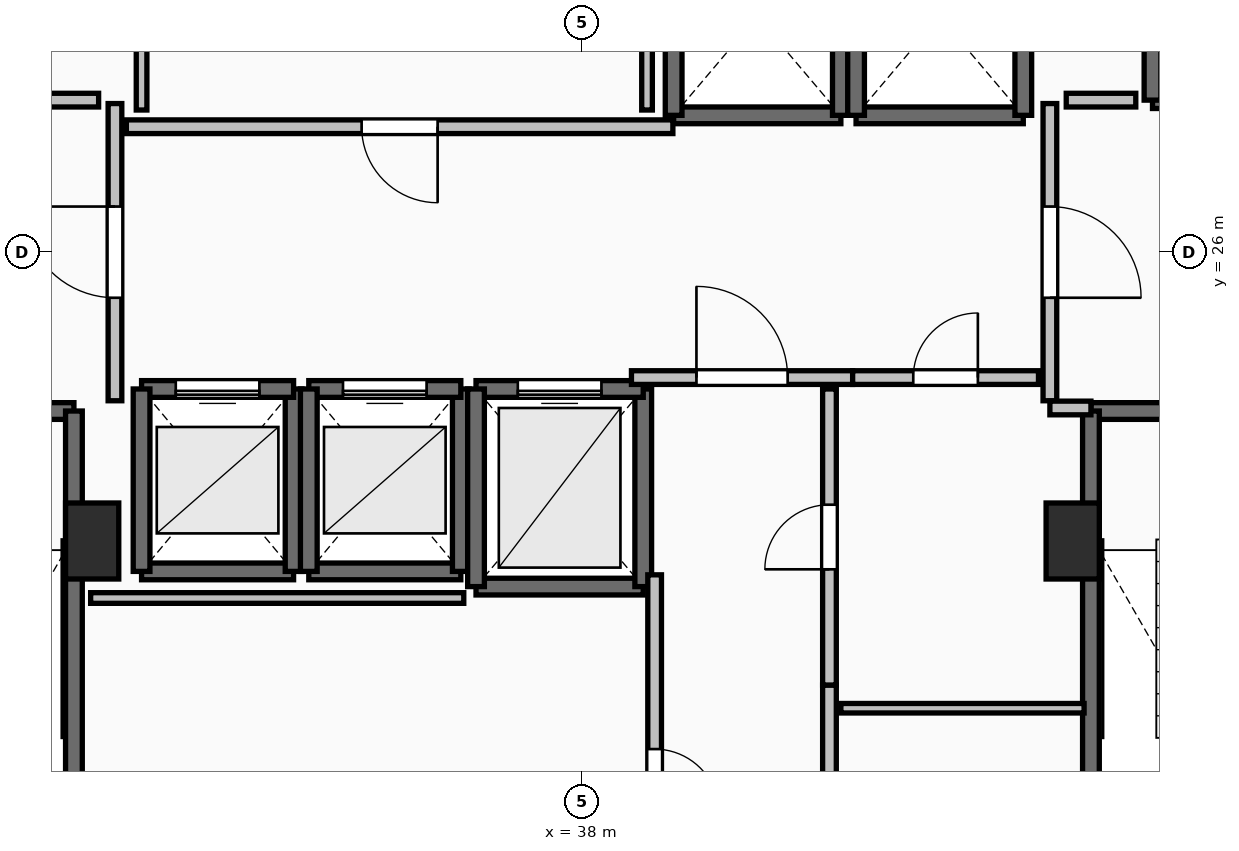
"""IFC4 building model, lengths in metres.
Left out: names, types, materials, properties, quantities, classifications, styles, units other than length and angle.
Written with IfcOpenShell. Run it as: python <this file> out.ifc"""

import sys

from ifc_helpers import new_model, si_unit, direction, frame, frame_2d, origin, origin_2d, place, context, subcontext, project, spatial, rectangle, extrude, element, fill, save


model = new_model("IFC4")
c1 = context("Model", 3, precision=1e-05, world=origin(), true_north=direction((0.0, 1.0)))
c2 = subcontext(c1, "Body", "Model", "MODEL_VIEW")
j1 = project(units=[si_unit("LENGTHUNIT", "METRE"), si_unit("PLANEANGLEUNIT", "RADIAN")], contexts=[c1])
p1 = place(None, origin())
s1 = spatial("IfcSite", under=j1, at=p1, CompositionType="ELEMENT")
p2 = place(p1, origin())
s2 = spatial("IfcBuilding", under=s1, at=p2, CompositionType="ELEMENT")
p3 = place(p2, frame((0.0, 0.0, 182.6)))
s3 = spatial("IfcBuildingStorey", under=s2, at=p3, CompositionType="ELEMENT", Elevation=182.6)
for number, where, z_axis, x_axis in (
    (1, (31.55, 22.2, 0.0), (0.0, 0.0, 1.0), (1.0, 0.0, 0.0)),
    (2, (44.45, 22.2, 0.0), (0.0, 0.0, 1.0), (1.0, 0.0, 0.0)),
):
    element("IfcColumn", number, at=place(p3, frame(where, z_axis=z_axis, x_axis=x_axis)), inside=s3, PredefinedType="PILASTER", context=c2, shape_type="SweptSolid", body=[
        extrude(rectangle(XDim=0.7, YDim=1.0, at=origin_2d()), origin(), (0.0, 0.0, 1.0), 3.5),
    ])
p4 = place(p3, frame((27.94, 23.91, 0.0), z_axis=(0.0, 0.0, 1.0), x_axis=(1.0, 0.0, 0.0)))
e3 = element("IfcWall", 3, at=p4, inside=s3, PredefinedType="SOLIDWALL", context=c2, shape_type="SweptSolid", body=[
    extrude(rectangle(XDim=3.37, YDim=0.22, at=frame_2d((1.685, 0.0))), origin(), (0.0, 0.0, 1.0), 3.24),
])
p5 = place(p4, frame((1.135, 0.0, 0.0)))
e4 = element("IfcOpeningElement", 4, at=p5, cuts=e3, PredefinedType="OPENING", context=c2, shape_type="SweptSolid", body=[
    extrude(rectangle(XDim=1.1, YDim=2.15, at=frame_2d((0.55, 1.075))), frame((0.0, 0.125, 0.0), z_axis=(0.0, -1.0, 0.0), x_axis=(1.0, 0.0, 0.0)), (0.0, 0.0, 1.0), 0.25),
])
p6 = place(p3, frame((31.31, 23.91, 0.0), z_axis=(0.0, 0.0, 1.0), x_axis=(0.0, -1.0, 0.0)))
e5 = element("IfcWall", 5, at=p6, inside=s3, PredefinedType="SOLIDWALL", context=c2, shape_type="SweptSolid", body=[
    extrude(rectangle(XDim=7.42, YDim=0.22, at=frame_2d((3.71, 0.0))), origin(), (0.0, 0.0, 1.0), 3.24),
])
p7 = place(p3, frame((44.69, 23.91, 0.0), z_axis=(0.0, 0.0, 1.0), x_axis=(1.0, 0.0, 0.0)))
e6 = element("IfcWall", 6, at=p7, inside=s3, PredefinedType="SOLIDWALL", context=c2, shape_type="SweptSolid", body=[
    extrude(rectangle(XDim=3.37, YDim=0.22, at=frame_2d((1.685, 0.0))), origin(), (0.0, 0.0, 1.0), 3.24),
])
p8 = place(p7, frame((1.135, 0.0, 0.0)))
e7 = element("IfcOpeningElement", 7, at=p8, cuts=e6, PredefinedType="OPENING", context=c2, shape_type="SweptSolid", body=[
    extrude(rectangle(XDim=1.1, YDim=2.15, at=frame_2d((0.55, 1.075))), frame((0.0, 0.125, 0.0), z_axis=(0.0, -1.0, 0.0), x_axis=(1.0, 0.0, 0.0)), (0.0, 0.0, 1.0), 0.25),
])
p9 = place(p3, frame((44.69, 16.49, 0.0), z_axis=(0.0, 0.0, 1.0), x_axis=(0.0, 1.0, 0.0)))
e8 = element("IfcWall", 8, at=p9, inside=s3, PredefinedType="SOLIDWALL", context=c2, shape_type="SweptSolid", body=[
    extrude(rectangle(XDim=7.42, YDim=0.22, at=frame_2d((3.71, 0.0))), origin(), (0.0, 0.0, 1.0), 3.24),
])
p10 = place(p3, frame((32.2, 21.8, 0.0), z_axis=(0.0, 0.0, 1.0), x_axis=(1.0, 0.0, 0.0)))
e9 = element("IfcWall", 9, at=p10, inside=s3, PredefinedType="SOLIDWALL", context=c2, shape_type="SweptSolid", body=[
    extrude(rectangle(XDim=2.0, YDim=0.22, at=frame_2d((1.0, 0.0))), origin(), (0.0, 0.0, 1.0), 3.24),
])
p11 = place(p3, frame((34.2, 21.8, 0.0), z_axis=(0.0, 0.0, 1.0), x_axis=(0.0, 1.0, 0.0)))
e10 = element("IfcWall", 10, at=p11, inside=s3, PredefinedType="SOLIDWALL", context=c2, shape_type="SweptSolid", body=[
    extrude(rectangle(XDim=2.4, YDim=0.22, at=frame_2d((1.2, 0.0))), origin(), (0.0, 0.0, 1.0), 3.24),
])
p12 = place(p3, frame((34.2, 24.2, 0.0), z_axis=(0.0, 0.0, 1.0), x_axis=(-1.0, 0.0, 0.0)))
e11 = element("IfcWall", 11, at=p12, inside=s3, PredefinedType="SOLIDWALL", context=c2, shape_type="SweptSolid", body=[
    extrude(rectangle(XDim=2.0, YDim=0.22, at=frame_2d((1.0, 0.0))), origin(), (0.0, 0.0, 1.0), 3.24),
])
p13 = place(p12, frame((0.45, 0.0, 0.0)))
e12 = element("IfcOpeningElement", 12, at=p13, cuts=e11, PredefinedType="OPENING", context=c2, shape_type="SweptSolid", body=[
    extrude(rectangle(XDim=1.1, YDim=2.2, at=frame_2d((0.55, 1.1))), frame((0.0, 0.125, 0.0), z_axis=(0.0, -1.0, 0.0), x_axis=(1.0, 0.0, 0.0)), (0.0, 0.0, 1.0), 0.25),
])
p14 = place(p3, frame((32.2, 24.2, 0.0), z_axis=(0.0, 0.0, 1.0), x_axis=(0.0, -1.0, 0.0)))
e13 = element("IfcWall", 13, at=p14, inside=s3, PredefinedType="SOLIDWALL", context=c2, shape_type="SweptSolid", body=[
    extrude(rectangle(XDim=2.4, YDim=0.22, at=frame_2d((1.2, 0.0))), origin(), (0.0, 0.0, 1.0), 3.24),
])
p15 = place(p3, frame((34.4, 21.8, 0.0), z_axis=(0.0, 0.0, 1.0), x_axis=(1.0, 0.0, 0.0)))
e14 = element("IfcWall", 14, at=p15, inside=s3, PredefinedType="SOLIDWALL", context=c2, shape_type="SweptSolid", body=[
    extrude(rectangle(XDim=2.0, YDim=0.22, at=frame_2d((1.0, 0.0))), origin(), (0.0, 0.0, 1.0), 3.24),
])
p16 = place(p3, frame((36.4, 21.8, 0.0), z_axis=(0.0, 0.0, 1.0), x_axis=(0.0, 1.0, 0.0)))
e15 = element("IfcWall", 15, at=p16, inside=s3, PredefinedType="SOLIDWALL", context=c2, shape_type="SweptSolid", body=[
    extrude(rectangle(XDim=2.4, YDim=0.22, at=frame_2d((1.2, 0.0))), origin(), (0.0, 0.0, 1.0), 3.24),
])
p17 = place(p3, frame((36.4, 24.2, 0.0), z_axis=(0.0, 0.0, 1.0), x_axis=(-1.0, 0.0, 0.0)))
e16 = element("IfcWall", 16, at=p17, inside=s3, PredefinedType="SOLIDWALL", context=c2, shape_type="SweptSolid", body=[
    extrude(rectangle(XDim=2.0, YDim=0.22, at=frame_2d((1.0, 0.0))), origin(), (0.0, 0.0, 1.0), 3.24),
])
p18 = place(p17, frame((0.45, 0.0, 0.0)))
e17 = element("IfcOpeningElement", 17, at=p18, cuts=e16, PredefinedType="OPENING", context=c2, shape_type="SweptSolid", body=[
    extrude(rectangle(XDim=1.1, YDim=2.2, at=frame_2d((0.55, 1.1))), frame((0.0, 0.125, 0.0), z_axis=(0.0, -1.0, 0.0), x_axis=(1.0, 0.0, 0.0)), (0.0, 0.0, 1.0), 0.25),
])
p19 = place(p3, frame((34.4, 24.2, 0.0), z_axis=(0.0, 0.0, 1.0), x_axis=(0.0, -1.0, 0.0)))
e18 = element("IfcWall", 18, at=p19, inside=s3, PredefinedType="SOLIDWALL", context=c2, shape_type="SweptSolid", body=[
    extrude(rectangle(XDim=2.4, YDim=0.22, at=frame_2d((1.2, 0.0))), origin(), (0.0, 0.0, 1.0), 3.24),
])
p20 = place(p3, frame((36.6, 21.6, 0.0), z_axis=(0.0, 0.0, 1.0), x_axis=(1.0, 0.0, 0.0)))
e19 = element("IfcWall", 19, at=p20, inside=s3, PredefinedType="SOLIDWALL", context=c2, shape_type="SweptSolid", body=[
    extrude(rectangle(XDim=2.2, YDim=0.22, at=frame_2d((1.1, 0.0))), origin(), (0.0, 0.0, 1.0), 3.24),
])
p21 = place(p3, frame((38.8, 21.6, 0.0), z_axis=(0.0, 0.0, 1.0), x_axis=(0.0, 1.0, 0.0)))
e20 = element("IfcWall", 20, at=p21, inside=s3, PredefinedType="SOLIDWALL", context=c2, shape_type="SweptSolid", body=[
    extrude(rectangle(XDim=2.6, YDim=0.22, at=frame_2d((1.3, 0.0))), origin(), (0.0, 0.0, 1.0), 3.24),
])
p22 = place(p3, frame((38.8, 24.2, 0.0), z_axis=(0.0, 0.0, 1.0), x_axis=(-1.0, 0.0, 0.0)))
e21 = element("IfcWall", 21, at=p22, inside=s3, PredefinedType="SOLIDWALL", context=c2, shape_type="SweptSolid", body=[
    extrude(rectangle(XDim=2.2, YDim=0.22, at=frame_2d((1.1, 0.0))), origin(), (0.0, 0.0, 1.0), 3.24),
])
p23 = place(p22, frame((0.55, 0.0, 0.0)))
e22 = element("IfcOpeningElement", 22, at=p23, cuts=e21, PredefinedType="OPENING", context=c2, shape_type="SweptSolid", body=[
    extrude(rectangle(XDim=1.1, YDim=2.2, at=frame_2d((0.55, 1.1))), frame((0.0, 0.125, 0.0), z_axis=(0.0, -1.0, 0.0), x_axis=(1.0, 0.0, 0.0)), (0.0, 0.0, 1.0), 0.25),
])
p24 = place(p3, frame((36.6, 24.2, 0.0), z_axis=(0.0, 0.0, 1.0), x_axis=(0.0, -1.0, 0.0)))
e23 = element("IfcWall", 23, at=p24, inside=s3, PredefinedType="SOLIDWALL", context=c2, shape_type="SweptSolid", body=[
    extrude(rectangle(XDim=2.6, YDim=0.22, at=frame_2d((1.3, 0.0))), origin(), (0.0, 0.0, 1.0), 3.24),
])
p25 = place(p3, frame((39.2, 27.8, 0.0), z_axis=(0.0, 0.0, 1.0), x_axis=(1.0, 0.0, 0.0)))
e24 = element("IfcWall", 24, at=p25, inside=s3, PredefinedType="SOLIDWALL", context=c2, shape_type="SweptSolid", body=[
    extrude(rectangle(XDim=2.2, YDim=0.22, at=frame_2d((1.1, 0.0))), origin(), (0.0, 0.0, 1.0), 3.24),
])
for number, where, z_axis, x_axis in (
    (25, (41.4, 27.8, 0.0), (0.0, 0.0, 1.0), (0.0, 1.0, 0.0)),
    (26, (39.2, 30.4, 0.0), (0.0, 0.0, 1.0), (0.0, -1.0, 0.0)),
):
    element("IfcWall", number, at=place(p3, frame(where, z_axis=z_axis, x_axis=x_axis)), inside=s3, PredefinedType="SOLIDWALL", context=c2, shape_type="SweptSolid", body=[
        extrude(rectangle(XDim=2.6, YDim=0.22, at=frame_2d((1.3, 0.0))), origin(), (0.0, 0.0, 1.0), 3.24),
    ])
p26 = place(p3, frame((41.6, 27.8, 0.0), z_axis=(0.0, 0.0, 1.0), x_axis=(1.0, 0.0, 0.0)))
e27 = element("IfcWall", 27, at=p26, inside=s3, PredefinedType="SOLIDWALL", context=c2, shape_type="SweptSolid", body=[
    extrude(rectangle(XDim=2.2, YDim=0.22, at=frame_2d((1.1, 0.0))), origin(), (0.0, 0.0, 1.0), 3.24),
])
for number, where, z_axis, x_axis in (
    (28, (43.8, 27.8, 0.0), (0.0, 0.0, 1.0), (0.0, 1.0, 0.0)),
    (29, (41.6, 30.4, 0.0), (0.0, 0.0, 1.0), (0.0, -1.0, 0.0)),
):
    element("IfcWall", number, at=place(p3, frame(where, z_axis=z_axis, x_axis=x_axis)), inside=s3, PredefinedType="SOLIDWALL", context=c2, shape_type="SweptSolid", body=[
        extrude(rectangle(XDim=2.6, YDim=0.22, at=frame_2d((1.3, 0.0))), origin(), (0.0, 0.0, 1.0), 3.24),
    ])
p27 = place(p3, frame((45.5, 28.0, 0.0), z_axis=(0.0, 0.0, 1.0), x_axis=(1.0, 0.0, 0.0)))
e30 = element("IfcWall", 30, at=p27, inside=s3, PredefinedType="SHEAR", context=c2, shape_type="SweptSolid", body=[
    extrude(rectangle(XDim=2.4, YDim=0.22, at=frame_2d((1.2, 0.0))), origin(), (0.0, 0.0, 1.0), 3.24),
])
p28 = place(p27, frame((0.6, 0.0, 0.0)))
e31 = element("IfcOpeningElement", 31, at=p28, cuts=e30, PredefinedType="OPENING", context=c2, shape_type="SweptSolid", body=[
    extrude(rectangle(XDim=1.2, YDim=2.2, at=frame_2d((0.6, 1.1))), frame((0.0, 0.125, 0.0), z_axis=(0.0, -1.0, 0.0), x_axis=(1.0, 0.0, 0.0)), (0.0, 0.0, 1.0), 0.25),
])
p29 = place(p3, frame((45.5, 30.5, 0.0), z_axis=(0.0, 0.0, 1.0), x_axis=(0.0, -1.0, 0.0)))
e32 = element("IfcWall", 32, at=p29, inside=s3, PredefinedType="SHEAR", context=c2, shape_type="SweptSolid", body=[
    extrude(rectangle(XDim=2.5, YDim=0.22, at=frame_2d((1.25, 0.0))), origin(), (0.0, 0.0, 1.0), 3.24),
])
p30 = place(p3, frame((31.85, 24.045, 0.0), z_axis=(0.0, 0.0, 1.0), x_axis=(0.0, 1.0, 0.0)))
e33 = element("IfcWall", 33, at=p30, inside=s3, PredefinedType="PARTITIONING", context=c2, shape_type="SweptSolid", body=[
    extrude(rectangle(XDim=3.91, YDim=0.18, at=frame_2d((1.955, 0.0))), origin(), (0.0, 0.0, 1.0), 3.24),
])
p31 = place(p30, frame((1.355, 0.0, 0.0)))
e34 = element("IfcOpeningElement", 34, at=p31, cuts=e33, PredefinedType="OPENING", context=c2, shape_type="SweptSolid", body=[
    extrude(rectangle(XDim=1.2, YDim=2.15, at=frame_2d((0.6, 1.075))), frame((0.0, 0.105, 0.0), z_axis=(0.0, -1.0, 0.0), x_axis=(1.0, 0.0, 0.0)), (0.0, 0.0, 1.0), 0.21),
])
p32 = place(p3, frame((44.15, 27.955, 0.0), z_axis=(0.0, 0.0, 1.0), x_axis=(0.0, -1.0, 0.0)))
e35 = element("IfcWall", 35, at=p32, inside=s3, PredefinedType="PARTITIONING", context=c2, shape_type="SweptSolid", body=[
    extrude(rectangle(XDim=3.91, YDim=0.18, at=frame_2d((1.955, 0.0))), origin(), (0.0, 0.0, 1.0), 3.24),
])
p33 = place(p32, frame((1.355, 0.0, 0.0)))
e36 = element("IfcOpeningElement", 36, at=p33, cuts=e35, PredefinedType="OPENING", context=c2, shape_type="SweptSolid", body=[
    extrude(rectangle(XDim=1.2, YDim=2.15, at=frame_2d((0.6, 1.075))), frame((0.0, 0.105, 0.0), z_axis=(0.0, -1.0, 0.0), x_axis=(1.0, 0.0, 0.0)), (0.0, 0.0, 1.0), 0.21),
])
p34 = place(p3, frame((44.15, 23.95, 0.0), z_axis=(0.0, 0.0, 1.0), x_axis=(1.0, 0.0, 0.0)))
e37 = element("IfcWall", 37, at=p34, inside=s3, PredefinedType="PARTITIONING", context=c2, shape_type="SweptSolid", body=[
    extrude(rectangle(XDim=0.54, YDim=0.18, at=frame_2d((0.27, 0.0))), origin(), (0.0, 0.0, 1.0), 3.24),
])
p35 = place(p3, frame((38.645, 24.35, 0.0), z_axis=(0.0, 0.0, 1.0), x_axis=(1.0, 0.0, 0.0)))
e38 = element("IfcWall", 38, at=p35, inside=s3, PredefinedType="PARTITIONING", context=c2, shape_type="SweptSolid", body=[
    extrude(rectangle(XDim=2.91, YDim=0.18, at=frame_2d((1.455, 0.0))), origin(), (0.0, 0.0, 1.0), 3.24),
])
p36 = place(p35, frame((0.855, 0.0, 0.0)))
e39 = element("IfcOpeningElement", 39, at=p36, cuts=e38, PredefinedType="OPENING", context=c2, shape_type="SweptSolid", body=[
    extrude(rectangle(XDim=1.2, YDim=2.15, at=frame_2d((0.6, 1.075))), frame((0.0, 0.105, 0.0), z_axis=(0.0, -1.0, 0.0), x_axis=(1.0, 0.0, 0.0)), (0.0, 0.0, 1.0), 0.21),
])
p37 = place(p3, frame((41.555, 24.35, 0.0), z_axis=(0.0, 0.0, 1.0), x_axis=(1.0, 0.0, 0.0)))
e40 = element("IfcWall", 40, at=p37, inside=s3, PredefinedType="PARTITIONING", context=c2, shape_type="SweptSolid", body=[
    extrude(rectangle(XDim=2.445, YDim=0.18, at=frame_2d((1.223, 0.0))), origin(), (0.0, 0.0, 1.0), 3.24),
])
p38 = place(p37, frame((0.798, 0.0, 0.0)))
e41 = element("IfcOpeningElement", 41, at=p38, cuts=e40, PredefinedType="OPENING", context=c2, shape_type="SweptSolid", body=[
    extrude(rectangle(XDim=0.85, YDim=2.1, at=frame_2d((0.425, 1.05))), frame((0.0, 0.105, 0.0), z_axis=(0.0, -1.0, 0.0), x_axis=(1.0, 0.0, 0.0)), (0.0, 0.0, 1.0), 0.21),
])
p39 = place(p3, frame((39.19, 27.65, 0.0), z_axis=(0.0, 0.0, 1.0), x_axis=(-1.0, 0.0, 0.0)))
e42 = element("IfcWall", 42, at=p39, inside=s3, PredefinedType="PARTITIONING", context=c2, shape_type="SweptSolid", body=[
    extrude(rectangle(XDim=7.19, YDim=0.18, at=frame_2d((3.595, 0.0))), origin(), (0.0, 0.0, 1.0), 3.24),
])
p40 = place(p39, frame((3.095, 0.0, 0.0)))
e43 = element("IfcOpeningElement", 43, at=p40, cuts=e42, PredefinedType="OPENING", context=c2, shape_type="SweptSolid", body=[
    extrude(rectangle(XDim=1.0, YDim=2.15, at=frame_2d((0.5, 1.075))), frame((0.0, 0.105, 0.0), z_axis=(0.0, -1.0, 0.0), x_axis=(1.0, 0.0, 0.0)), (0.0, 0.0, 1.0), 0.21),
])
p41 = place(p3, frame((41.25, 16.32, 0.0), z_axis=(0.0, 0.0, 1.0), x_axis=(0.0, 1.0, 0.0)))
e44 = element("IfcWall", 44, at=p41, inside=s3, PredefinedType="PARTITIONING", context=c2, shape_type="SweptSolid", body=[
    extrude(rectangle(XDim=3.985, YDim=0.18, at=frame_2d((1.992, 0.0))), origin(), (0.0, 0.0, 1.0), 3.24),
])
p42 = place(p41, frame((1.593, 0.0, 0.0)))
e45 = element("IfcOpeningElement", 45, at=p42, cuts=e44, PredefinedType="OPENING", context=c2, shape_type="SweptSolid", body=[
    extrude(rectangle(XDim=0.8, YDim=2.05, at=frame_2d((0.4, 1.025))), frame((0.0, 0.105, 0.0), z_axis=(0.0, -1.0, 0.0), x_axis=(1.0, 0.0, 0.0)), (0.0, 0.0, 1.0), 0.21),
])
p43 = place(p3, frame((41.25, 20.305, 0.0), z_axis=(0.0, 0.0, 1.0), x_axis=(0.0, 1.0, 0.0)))
e46 = element("IfcWall", 46, at=p43, inside=s3, PredefinedType="PARTITIONING", context=c2, shape_type="SweptSolid", body=[
    extrude(rectangle(XDim=3.895, YDim=0.18, at=frame_2d((1.948, 0.0))), origin(), (0.0, 0.0, 1.0), 3.24),
])
p44 = place(p43, frame((1.522, 0.0, 0.0)))
e47 = element("IfcOpeningElement", 47, at=p44, cuts=e46, PredefinedType="OPENING", context=c2, shape_type="SweptSolid", body=[
    extrude(rectangle(XDim=0.85, YDim=2.1, at=frame_2d((0.425, 1.05))), frame((0.0, 0.105, 0.0), z_axis=(0.0, -1.0, 0.0), x_axis=(1.0, 0.0, 0.0)), (0.0, 0.0, 1.0), 0.21),
])
p45 = place(p3, frame((38.95, 21.755, 0.0), z_axis=(0.0, 0.0, 1.0), x_axis=(0.0, -1.0, 0.0)))
e48 = element("IfcWall", 48, at=p45, inside=s3, PredefinedType="PARTITIONING", context=c2, shape_type="SweptSolid", body=[
    extrude(rectangle(XDim=5.435, YDim=0.18, at=frame_2d((2.717, 0.0))), origin(), (0.0, 0.0, 1.0), 3.24),
])
p46 = place(p45, frame((2.292, 0.0, 0.0)))
e49 = element("IfcOpeningElement", 49, at=p46, cuts=e48, PredefinedType="OPENING", context=c2, shape_type="SweptSolid", body=[
    extrude(rectangle(XDim=0.85, YDim=2.1, at=frame_2d((0.425, 1.05))), frame((0.0, 0.105, 0.0), z_axis=(0.0, -1.0, 0.0), x_axis=(1.0, 0.0, 0.0)), (0.0, 0.0, 1.0), 0.21),
])
p47 = place(p3, frame((44.6, 20.0, 0.0), z_axis=(0.0, 0.0, 1.0), x_axis=(-1.0, 0.0, 0.0)))
e50 = element("IfcWall", 50, at=p47, inside=s3, PredefinedType="PARTITIONING", context=c2, shape_type="SweptSolid", body=[
    extrude(rectangle(XDim=3.2, YDim=0.125, at=frame_2d((1.6, 0.0))), origin(), (0.0, 0.0, 1.0), 3.24),
])
for number, where, z_axis, x_axis in (
    (51, (31.635, 28.0, 0.0), (0.0, 0.0, 1.0), (-1.0, 0.0, 0.0)),
    (52, (45.28, 28.0, 0.0), (0.0, 0.0, 1.0), (-1.0, 0.0, 0.0)),
):
    element("IfcWall", number, at=place(p3, frame(where, z_axis=z_axis, x_axis=x_axis)), inside=s3, PredefinedType="PARTITIONING", context=c2, shape_type="SweptSolid", body=[
        extrude(rectangle(XDim=0.915, YDim=0.18, at=frame_2d((0.458, 0.0))), origin(), (0.0, 0.0, 1.0), 3.24),
    ])
p48 = place(p3, frame((36.439, 21.45, 0.0), z_axis=(0.0, 0.0, 1.0), x_axis=(-1.0, 0.0, 0.0)))
e53 = element("IfcWall", 53, at=p48, inside=s3, PredefinedType="PARTITIONING", context=c2, shape_type="SweptSolid", body=[
    extrude(rectangle(XDim=4.909, YDim=0.14, at=frame_2d((2.455, 0.0))), origin(), (0.0, 0.0, 1.0), 3.24),
])
for number, where, z_axis, x_axis in (
    (54, (32.2, 30.26, 0.0), (0.0, 0.0, 1.0), (0.0, -1.0, 0.0)),
    (55, (38.85, 27.87, 0.0), (0.0, 0.0, 1.0), (0.0, 1.0, 0.0)),
):
    element("IfcWall", number, at=place(p3, frame(where, z_axis=z_axis, x_axis=x_axis)), inside=s3, PredefinedType="PARTITIONING", context=c2, shape_type="SweptSolid", body=[
        extrude(rectangle(XDim=2.39, YDim=0.14, at=frame_2d((1.195, 0.0))), origin(), (0.0, 0.0, 1.0), 3.24),
    ])
p49 = place(p13, origin())
e56 = element("IfcDoor", 56, at=p49, inside=s3, OperationType="SLIDING_TO_LEFT", PredefinedType="DOOR", context=c2, shape_type="SweptSolid", body=[
    extrude(rectangle(XDim=1.1, YDim=2.2, at=frame_2d((0.55, 1.1))), frame((0.0, 0.025, 0.0), z_axis=(0.0, -1.0, 0.0), x_axis=(1.0, 0.0, 0.0)), (0.0, 0.0, 1.0), 0.05),
])
fill(e12, e56)
p50 = place(p18, origin())
e57 = element("IfcDoor", 57, at=p50, inside=s3, OperationType="SLIDING_TO_LEFT", PredefinedType="DOOR", context=c2, shape_type="SweptSolid", body=[
    extrude(rectangle(XDim=1.1, YDim=2.2, at=frame_2d((0.55, 1.1))), frame((0.0, 0.025, 0.0), z_axis=(0.0, -1.0, 0.0), x_axis=(1.0, 0.0, 0.0)), (0.0, 0.0, 1.0), 0.05),
])
fill(e17, e57)
p51 = place(p23, origin())
e58 = element("IfcDoor", 58, at=p51, inside=s3, OperationType="SLIDING_TO_LEFT", PredefinedType="DOOR", context=c2, shape_type="SweptSolid", body=[
    extrude(rectangle(XDim=1.1, YDim=2.2, at=frame_2d((0.55, 1.1))), frame((0.0, 0.025, 0.0), z_axis=(0.0, -1.0, 0.0), x_axis=(1.0, 0.0, 0.0)), (0.0, 0.0, 1.0), 0.05),
])
fill(e22, e58)
p52 = place(p31, origin())
e59 = element("IfcDoor", 59, at=p52, inside=s3, OperationType="SINGLE_SWING_RIGHT", PredefinedType="DOOR", context=c2, shape_type="SweptSolid", body=[
    extrude(rectangle(XDim=1.2, YDim=2.15, at=frame_2d((0.6, 1.075))), frame((0.0, 0.025, 0.0), z_axis=(0.0, -1.0, 0.0), x_axis=(1.0, 0.0, 0.0)), (0.0, 0.0, 1.0), 0.05),
])
fill(e34, e59)
p53 = place(p33, origin())
e60 = element("IfcDoor", 60, at=p53, inside=s3, OperationType="SINGLE_SWING_RIGHT", PredefinedType="DOOR", context=c2, shape_type="SweptSolid", body=[
    extrude(rectangle(XDim=1.2, YDim=2.15, at=frame_2d((0.6, 1.075))), frame((0.0, 0.025, 0.0), z_axis=(0.0, -1.0, 0.0), x_axis=(1.0, 0.0, 0.0)), (0.0, 0.0, 1.0), 0.05),
])
fill(e36, e60)
p54 = place(p36, origin())
e61 = element("IfcDoor", 61, at=p54, inside=s3, OperationType="SINGLE_SWING_LEFT", PredefinedType="DOOR", context=c2, shape_type="SweptSolid", body=[
    extrude(rectangle(XDim=1.2, YDim=2.15, at=frame_2d((0.6, 1.075))), frame((0.0, 0.025, 0.0), z_axis=(0.0, -1.0, 0.0), x_axis=(1.0, 0.0, 0.0)), (0.0, 0.0, 1.0), 0.05),
])
fill(e39, e61)
p55 = place(p38, origin())
e62 = element("IfcDoor", 62, at=p55, inside=s3, OperationType="SINGLE_SWING_RIGHT", PredefinedType="DOOR", context=c2, shape_type="SweptSolid", body=[
    extrude(rectangle(XDim=0.85, YDim=2.1, at=frame_2d((0.425, 1.05))), frame((0.0, 0.025, 0.0), z_axis=(0.0, -1.0, 0.0), x_axis=(1.0, 0.0, 0.0)), (0.0, 0.0, 1.0), 0.05),
])
fill(e41, e62)
p56 = place(p40, origin())
e63 = element("IfcDoor", 63, at=p56, inside=s3, OperationType="SINGLE_SWING_LEFT", PredefinedType="DOOR", context=c2, shape_type="SweptSolid", body=[
    extrude(rectangle(XDim=1.0, YDim=2.15, at=frame_2d((0.5, 1.075))), frame((0.0, 0.025, 0.0), z_axis=(0.0, -1.0, 0.0), x_axis=(1.0, 0.0, 0.0)), (0.0, 0.0, 1.0), 0.05),
])
fill(e43, e63)
p57 = place(p44, origin())
e64 = element("IfcDoor", 64, at=p57, inside=s3, OperationType="SINGLE_SWING_LEFT", PredefinedType="DOOR", context=c2, shape_type="SweptSolid", body=[
    extrude(rectangle(XDim=0.85, YDim=2.1, at=frame_2d((0.425, 1.05))), frame((0.0, 0.025, 0.0), z_axis=(0.0, -1.0, 0.0), x_axis=(1.0, 0.0, 0.0)), (0.0, 0.0, 1.0), 0.05),
])
fill(e47, e64)
p58 = place(p46, origin())
e65 = element("IfcDoor", 65, at=p58, inside=s3, OperationType="SINGLE_SWING_RIGHT", PredefinedType="DOOR", context=c2, shape_type="SweptSolid", body=[
    extrude(rectangle(XDim=0.85, YDim=2.1, at=frame_2d((0.425, 1.05))), frame((0.0, 0.025, 0.0), z_axis=(0.0, -1.0, 0.0), x_axis=(1.0, 0.0, 0.0)), (0.0, 0.0, 1.0), 0.05),
])
fill(e49, e65)
save(model, sys.argv[1])
